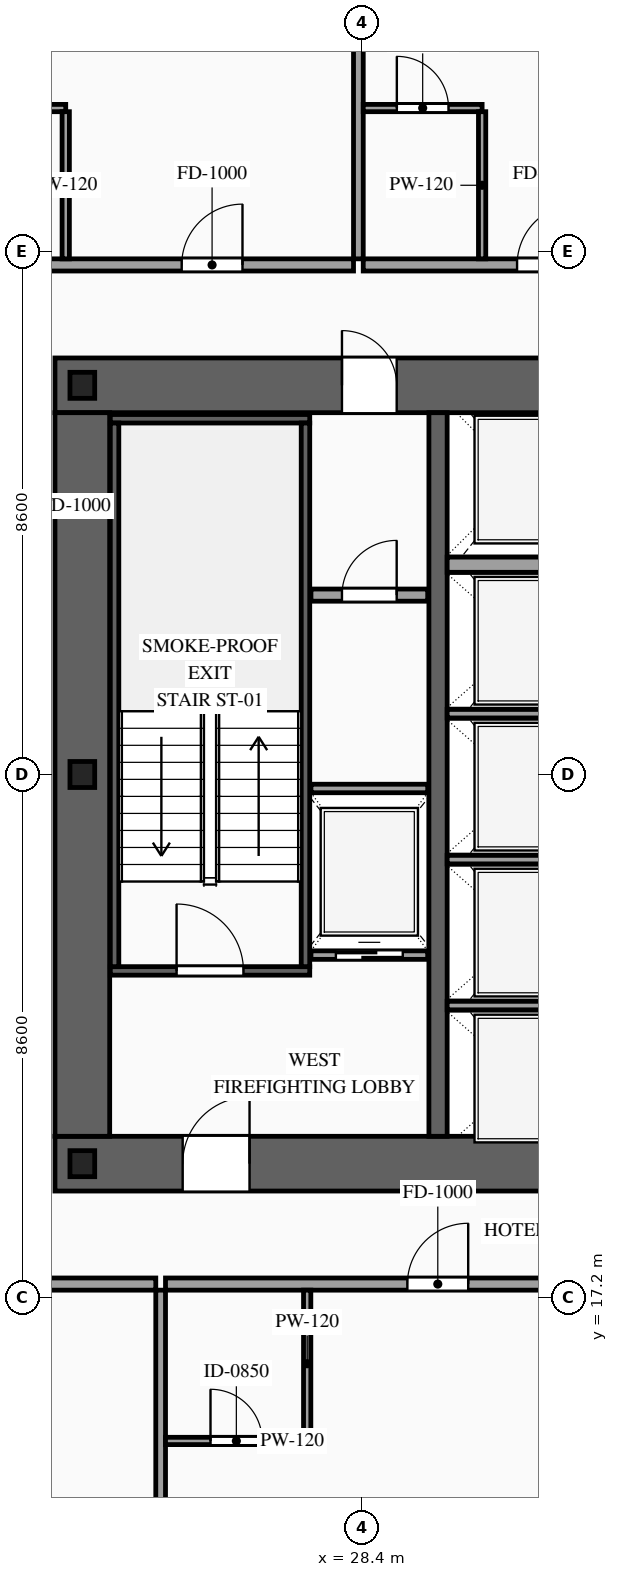
"""IFC4 building model, lengths in metres.
Left out: names, types, materials, properties, quantities, classifications, styles, units other than length and angle.
Written with IfcOpenShell. Run it as: python <this file> out.ifc"""

import sys

from ifc_helpers import new_model, si_unit, direction, frame, frame_2d, origin, origin_2d, place, context, subcontext, project, spatial, rectangle, i_section, extrude, source, transform, mapped, element, fill, save


model = new_model("IFC4")
c1 = context("Model", 3, precision=1e-05, world=origin(), true_north=direction((0.0, 1.0)))
c2 = subcontext(c1, "Body", "Model", "MODEL_VIEW")
j1 = project(units=[si_unit("LENGTHUNIT", "METRE"), si_unit("PLANEANGLEUNIT", "RADIAN")], contexts=[c1])
p1 = place(None, origin())
s1 = spatial("IfcSite", under=j1, at=p1, CompositionType="ELEMENT")
p2 = place(p1, origin())
s2 = spatial("IfcBuilding", under=s1, at=p2, CompositionType="ELEMENT")
p3 = place(p2, frame((0.0, 0.0, 46.0)))
s3 = spatial("IfcBuildingStorey", under=s2, at=p3, CompositionType="ELEMENT", Elevation=46.0)
p4 = place(p3, frame((23.35, 19.4, 0.0), z_axis=(0.0, 0.0, 1.0), x_axis=(1.0, 0.0, 0.0)))
e1 = element("IfcWall", 1, at=p4, inside=s3, PredefinedType="SHEAR", context=c2, shape_type="SweptSolid", body=[
    extrude(rectangle(XDim=27.3, YDim=0.9, at=frame_2d((13.65, 0.0))), origin(), (0.0, 0.0, 1.0), 3.6),
])
p5 = place(p4, frame((2.1, 0.0, 0.0)))
e2 = element("IfcOpeningElement", 2, at=p5, cuts=e1, PredefinedType="OPENING", context=c2, shape_type="SweptSolid", body=[
    extrude(rectangle(XDim=1.1, YDim=2.2, at=frame_2d((0.55, 1.1))), frame((0.0, 0.465, 0.0), z_axis=(0.0, -1.0, 0.0), x_axis=(1.0, 0.0, 0.0)), (0.0, 0.0, 1.0), 0.93),
])
p6 = place(p4, frame((10.0, 0.0, 0.0)))
e3 = element("IfcOpeningElement", 3, at=p6, cuts=e1, PredefinedType="OPENING", context=c2, shape_type="SweptSolid", body=[
    extrude(rectangle(XDim=1.1, YDim=2.2, at=frame_2d((0.55, 1.1))), frame((0.0, 0.465, 0.0), z_axis=(0.0, -1.0, 0.0), x_axis=(1.0, 0.0, 0.0)), (0.0, 0.0, 1.0), 0.93),
])
p7 = place(p4, frame((23.2, 0.0, 0.0)))
e4 = element("IfcOpeningElement", 4, at=p7, cuts=e1, PredefinedType="OPENING", context=c2, shape_type="SweptSolid", body=[
    extrude(rectangle(XDim=1.1, YDim=2.2, at=frame_2d((0.55, 1.1))), frame((0.0, 0.465, 0.0), z_axis=(0.0, -1.0, 0.0), x_axis=(1.0, 0.0, 0.0)), (0.0, 0.0, 1.0), 0.93),
])
p8 = place(p4, frame((19.82, 0.0, 0.0)))
e5 = element("IfcOpeningElement", 5, at=p8, cuts=e1, PredefinedType="OPENING", context=c2, shape_type="SweptSolid", body=[
    extrude(rectangle(XDim=0.9, YDim=2.15, at=frame_2d((0.45, 1.075))), frame((0.0, 0.465, 0.0), z_axis=(0.0, -1.0, 0.0), x_axis=(1.0, 0.0, 0.0)), (0.0, 0.0, 1.0), 0.93),
])
p9 = place(p4, frame((18.38, 0.0, 0.0)))
e6 = element("IfcOpeningElement", 6, at=p9, cuts=e1, PredefinedType="OPENING", context=c2, shape_type="SweptSolid", body=[
    extrude(rectangle(XDim=0.9, YDim=2.15, at=frame_2d((0.45, 1.075))), frame((0.0, 0.465, 0.0), z_axis=(0.0, -1.0, 0.0), x_axis=(1.0, 0.0, 0.0)), (0.0, 0.0, 1.0), 0.93),
])
p10 = place(p3, frame((23.35, 32.2, 0.0), z_axis=(0.0, 0.0, 1.0), x_axis=(1.0, 0.0, 0.0)))
e7 = element("IfcWall", 7, at=p10, inside=s3, PredefinedType="SHEAR", context=c2, shape_type="SweptSolid", body=[
    extrude(rectangle(XDim=27.3, YDim=0.9, at=frame_2d((13.65, 0.0))), origin(), (0.0, 0.0, 1.0), 3.6),
])
p11 = place(p10, frame((4.72, 0.0, 0.0)))
e8 = element("IfcOpeningElement", 8, at=p11, cuts=e7, PredefinedType="OPENING", context=c2, shape_type="SweptSolid", body=[
    extrude(rectangle(XDim=0.9, YDim=2.15, at=frame_2d((0.45, 1.075))), frame((0.0, 0.465, 0.0), z_axis=(0.0, -1.0, 0.0), x_axis=(1.0, 0.0, 0.0)), (0.0, 0.0, 1.0), 0.93),
])
p12 = place(p10, frame((10.0, 0.0, 0.0)))
e9 = element("IfcOpeningElement", 9, at=p12, cuts=e7, PredefinedType="OPENING", context=c2, shape_type="SweptSolid", body=[
    extrude(rectangle(XDim=1.1, YDim=2.2, at=frame_2d((0.55, 1.1))), frame((0.0, 0.465, 0.0), z_axis=(0.0, -1.0, 0.0), x_axis=(1.0, 0.0, 0.0)), (0.0, 0.0, 1.0), 0.93),
])
p13 = place(p10, frame((15.85, 0.0, 0.0)))
e10 = element("IfcOpeningElement", 10, at=p13, cuts=e7, PredefinedType="OPENING", context=c2, shape_type="SweptSolid", body=[
    extrude(rectangle(XDim=1.1, YDim=2.2, at=frame_2d((0.55, 1.1))), frame((0.0, 0.465, 0.0), z_axis=(0.0, -1.0, 0.0), x_axis=(1.0, 0.0, 0.0)), (0.0, 0.0, 1.0), 0.93),
])
p14 = place(p10, frame((19.05, 0.0, 0.0)))
e11 = element("IfcOpeningElement", 11, at=p14, cuts=e7, PredefinedType="OPENING", context=c2, shape_type="SweptSolid", body=[
    extrude(rectangle(XDim=0.9, YDim=2.15, at=frame_2d((0.45, 1.075))), frame((0.0, 0.465, 0.0), z_axis=(0.0, -1.0, 0.0), x_axis=(1.0, 0.0, 0.0)), (0.0, 0.0, 1.0), 0.93),
])
m1 = source(origin(), c2, "Body", "SweptSolid", [
    extrude(rectangle(XDim=11.9, YDim=0.9, at=frame_2d((5.95, 0.0))), origin(), (0.0, 0.0, 1.0), 3.6),
])
p15 = place(p3, frame((23.8, 19.85, 0.0), z_axis=(0.0, 0.0, 1.0), x_axis=(0.0, 1.0, 0.0)))
e12 = element("IfcWall", 12, at=p15, inside=s3, PredefinedType="SHEAR", context=c2, shape_type="MappedRepresentation", body=[
    mapped(m1, transform((0.0, 0.0, 0.0), scale=1.0)),
])
m2 = source(origin(), c2, "Body", "SweptSolid", [
    extrude(rectangle(XDim=11.9, YDim=0.3, at=frame_2d((5.95, 0.0))), origin(), (0.0, 0.0, 1.0), 3.6),
])
p16 = place(p3, frame((29.65, 19.85, 0.0), z_axis=(0.0, 0.0, 1.0), x_axis=(0.0, 1.0, 0.0)))
e13 = element("IfcWall", 13, at=p16, inside=s3, PredefinedType="SOLIDWALL", context=c2, shape_type="MappedRepresentation", body=[
    mapped(m2, transform((0.0, 0.0, 0.0), scale=1.0)),
])
m3 = source(origin(), c2, "Body", "SweptSolid", [
    extrude(i_section(OverallWidth=0.407, OverallDepth=0.428, WebThickness=0.02, FlangeThickness=0.035, at=origin_2d()), origin(), (0.0, 0.0, 1.0), 3.6),
])
for number, where, z_axis, x_axis in (
    (14, (23.8, 19.4, 0.0), (0.0, 0.0, 1.0), (1.0, 0.0, 0.0)),
    (15, (23.8, 25.8, 0.0), (0.0, 0.0, 1.0), (1.0, 0.0, 0.0)),
    (16, (23.8, 32.2, 0.0), (0.0, 0.0, 1.0), (1.0, 0.0, 0.0)),
):
    element("IfcColumn", number, at=place(p3, frame(where, z_axis=z_axis, x_axis=x_axis)), inside=s3, PredefinedType="COLUMN", context=c2, shape_type="MappedRepresentation", body=[
        mapped(m3, transform((0.0, 0.0, 0.0), scale=1.0)),
    ])
p17 = place(p3, frame((27.56, 22.83, 0.0), z_axis=(0.0, 0.0, 1.0), x_axis=(1.0, 0.0, 0.0)))
e17 = element("IfcWall", 17, at=p17, inside=s3, PredefinedType="SOLIDWALL", context=c2, shape_type="SweptSolid", body=[
    extrude(rectangle(XDim=1.92, YDim=0.14, at=frame_2d((0.96, 0.0))), origin(), (0.0, 0.0, 1.0), 3.38),
])
p18 = place(p17, frame((0.41, 0.0, 0.0)))
e18 = element("IfcOpeningElement", 18, at=p18, cuts=e17, PredefinedType="OPENING", context=c2, shape_type="SweptSolid", body=[
    extrude(rectangle(XDim=1.1, YDim=2.2, at=frame_2d((0.55, 1.1))), frame((0.0, 0.085, 0.0), z_axis=(0.0, -1.0, 0.0), x_axis=(1.0, 0.0, 0.0)), (0.0, 0.0, 1.0), 0.17),
])
m4 = source(origin(), c2, "Body", "SweptSolid", [
    extrude(rectangle(XDim=1.92, YDim=0.14, at=frame_2d((0.96, 0.0))), origin(), (0.0, 0.0, 1.0), 3.38),
])
p19 = place(p3, frame((27.56, 25.57, 0.0), z_axis=(0.0, 0.0, 1.0), x_axis=(1.0, 0.0, 0.0)))
e19 = element("IfcWall", 19, at=p19, inside=s3, PredefinedType="SOLIDWALL", context=c2, shape_type="MappedRepresentation", body=[
    mapped(m4, transform((0.0, 0.0, 0.0), scale=1.0)),
])
m5 = source(origin(), c2, "Body", "SweptSolid", [
    extrude(rectangle(XDim=2.5, YDim=0.14, at=frame_2d((1.25, 0.0))), origin(), (0.0, 0.0, 1.0), 3.38),
])
for number, where, z_axis, x_axis in (
    (20, (29.8, 22.0, 0.0), (0.0, 0.0, 1.0), (1.0, 0.0, 0.0)),
    (21, (29.8, 24.4, 0.0), (0.0, 0.0, 1.0), (1.0, 0.0, 0.0)),
    (22, (29.8, 26.8, 0.0), (0.0, 0.0, 1.0), (1.0, 0.0, 0.0)),
):
    element("IfcWall", number, at=place(p3, frame(where, z_axis=z_axis, x_axis=x_axis)), inside=s3, PredefinedType="SOLIDWALL", context=c2, shape_type="MappedRepresentation", body=[
        mapped(m5, transform((0.0, 0.0, 0.0), scale=1.0)),
    ])
m6 = source(origin(), c2, "Body", "SweptSolid", [
    extrude(rectangle(XDim=2.5, YDim=0.25, at=frame_2d((1.25, 0.0))), origin(), (0.0, 0.0, 1.0), 3.38),
])
p20 = place(p3, frame((29.8, 29.25, 0.0), z_axis=(0.0, 0.0, 1.0), x_axis=(1.0, 0.0, 0.0)))
e23 = element("IfcWall", 23, at=p20, inside=s3, PredefinedType="SOLIDWALL", context=c2, shape_type="MappedRepresentation", body=[
    mapped(m6, transform((0.0, 0.0, 0.0), scale=1.0)),
])
p21 = place(p3, frame((24.26, 22.57, 0.0), z_axis=(0.0, 0.0, 1.0), x_axis=(1.0, 0.0, 0.0)))
e24 = element("IfcWall", 24, at=p21, inside=s3, PredefinedType="SOLIDWALL", context=c2, shape_type="SweptSolid", body=[
    extrude(rectangle(XDim=3.28, YDim=0.14, at=frame_2d((1.64, 0.0))), origin(), (0.0, 0.0, 1.0), 3.38),
])
p22 = place(p21, frame((1.09, 0.0, 0.0)))
e25 = element("IfcOpeningElement", 25, at=p22, cuts=e24, PredefinedType="OPENING", context=c2, shape_type="SweptSolid", body=[
    extrude(rectangle(XDim=1.1, YDim=2.2, at=frame_2d((0.55, 1.1))), frame((0.0, 0.085, 0.0), z_axis=(0.0, -1.0, 0.0), x_axis=(1.0, 0.0, 0.0)), (0.0, 0.0, 1.0), 0.17),
])
m7 = source(origin(), c2, "Body", "SweptSolid", [
    extrude(rectangle(XDim=3.28, YDim=0.14, at=frame_2d((1.64, 0.0))), origin(), (0.0, 0.0, 1.0), 3.38),
])
p23 = place(p3, frame((24.26, 31.65, 0.0), z_axis=(0.0, 0.0, 1.0), x_axis=(1.0, 0.0, 0.0)))
e26 = element("IfcWall", 26, at=p23, inside=s3, PredefinedType="SOLIDWALL", context=c2, shape_type="MappedRepresentation", body=[
    mapped(m7, transform((0.0, 0.0, 0.0), scale=1.0)),
])
m8 = source(origin(), c2, "Body", "SweptSolid", [
    extrude(rectangle(XDim=8.94, YDim=0.14, at=frame_2d((4.47, 0.0))), origin(), (0.0, 0.0, 1.0), 3.38),
])
for number, where, z_axis, x_axis in (
    (27, (24.33, 22.64, 0.0), (0.0, 0.0, 1.0), (0.0, 1.0, 0.0)),
    (28, (27.47, 22.64, 0.0), (0.0, 0.0, 1.0), (0.0, 1.0, 0.0)),
):
    element("IfcWall", number, at=place(p3, frame(where, z_axis=z_axis, x_axis=x_axis)), inside=s3, PredefinedType="SOLIDWALL", context=c2, shape_type="MappedRepresentation", body=[
        mapped(m8, transform((0.0, 0.0, 0.0), scale=1.0)),
    ])
p24 = place(p3, frame((27.56, 28.75, 0.0), z_axis=(0.0, 0.0, 1.0), x_axis=(1.0, 0.0, 0.0)))
e29 = element("IfcWall", 29, at=p24, inside=s3, PredefinedType="PARTITIONING", context=c2, shape_type="SweptSolid", body=[
    extrude(rectangle(XDim=1.92, YDim=0.2, at=frame_2d((0.96, 0.0))), origin(), (0.0, 0.0, 1.0), 3.38),
])
p25 = place(p24, frame((0.51, 0.0, 0.0)))
e30 = element("IfcOpeningElement", 30, at=p25, cuts=e29, PredefinedType="OPENING", context=c2, shape_type="SweptSolid", body=[
    extrude(rectangle(XDim=0.9, YDim=2.15, at=frame_2d((0.45, 1.075))), frame((0.0, 0.115, 0.0), z_axis=(0.0, -1.0, 0.0), x_axis=(1.0, 0.0, 0.0)), (0.0, 0.0, 1.0), 0.23),
])
p26 = place(p3, frame((14.94, 17.42, 0.0), z_axis=(0.0, 0.0, 1.0), x_axis=(1.0, 0.0, 0.0)))
e31 = element("IfcWall", 31, at=p26, inside=s3, PredefinedType="PARTITIONING", context=c2, shape_type="SweptSolid", body=[
    extrude(rectangle(XDim=10.068, YDim=0.2, at=frame_2d((5.034, 0.0))), origin(), (0.0, 0.0, 1.0), 3.38),
])
p27 = place(p26, frame((5.739, 0.0, 0.0)))
e32 = element("IfcOpeningElement", 32, at=p27, cuts=e31, PredefinedType="OPENING", context=c2, shape_type="SweptSolid", body=[
    extrude(rectangle(XDim=1.0, YDim=2.2, at=frame_2d((0.5, 1.1))), frame((0.0, 0.115, 0.0), z_axis=(0.0, -1.0, 0.0), x_axis=(1.0, 0.0, 0.0)), (0.0, 0.0, 1.0), 0.23),
])
m9 = source(origin(), c2, "Body", "SweptSolid", [
    extrude(rectangle(XDim=16.47, YDim=0.16, at=frame_2d((8.235, 0.0))), origin(), (0.0, 0.0, 1.0), 3.38),
])
p28 = place(p3, frame((25.088, 0.85, 0.0), z_axis=(0.0, 0.0, 1.0), x_axis=(0.0, 1.0, 0.0)))
e33 = element("IfcWall", 33, at=p28, inside=s3, PredefinedType="PARTITIONING", context=c2, shape_type="MappedRepresentation", body=[
    mapped(m9, transform((0.0, 0.0, 0.0), scale=1.0)),
])
p29 = place(p3, frame((25.168, 17.42, 0.0), z_axis=(0.0, 0.0, 1.0), x_axis=(1.0, 0.0, 0.0)))
e34 = element("IfcWall", 34, at=p29, inside=s3, PredefinedType="PARTITIONING", context=c2, shape_type="SweptSolid", body=[
    extrude(rectangle(XDim=6.546, YDim=0.2, at=frame_2d((3.273, 0.0))), origin(), (0.0, 0.0, 1.0), 3.38),
])
p30 = place(p29, frame((3.978, 0.0, 0.0)))
e35 = element("IfcOpeningElement", 35, at=p30, cuts=e34, PredefinedType="OPENING", context=c2, shape_type="SweptSolid", body=[
    extrude(rectangle(XDim=1.0, YDim=2.2, at=frame_2d((0.5, 1.1))), frame((0.0, 0.115, 0.0), z_axis=(0.0, -1.0, 0.0), x_axis=(1.0, 0.0, 0.0)), (0.0, 0.0, 1.0), 0.23),
])
p31 = place(p3, frame((25.168, 14.84, 0.0), z_axis=(0.0, 0.0, 1.0), x_axis=(1.0, 0.0, 0.0)))
e36 = element("IfcWall", 36, at=p31, inside=s3, PredefinedType="PARTITIONING", context=c2, shape_type="SweptSolid", body=[
    extrude(rectangle(XDim=2.33, YDim=0.12, at=frame_2d((1.165, 0.0))), origin(), (0.0, 0.0, 1.0), 3.38),
])
p32 = place(p31, frame((0.74, 0.0, 0.0)))
e37 = element("IfcOpeningElement", 37, at=p32, cuts=e36, PredefinedType="OPENING", context=c2, shape_type="SweptSolid", body=[
    extrude(rectangle(XDim=0.85, YDim=2.1, at=frame_2d((0.425, 1.05))), frame((0.0, 0.075, 0.0), z_axis=(0.0, -1.0, 0.0), x_axis=(1.0, 0.0, 0.0)), (0.0, 0.0, 1.0), 0.15),
])
m10 = source(origin(), c2, "Body", "SweptSolid", [
    extrude(rectangle(XDim=2.42, YDim=0.12, at=frame_2d((1.21, 0.0))), origin(), (0.0, 0.0, 1.0), 3.38),
])
p33 = place(p3, frame((27.498, 14.9, 0.0), z_axis=(0.0, 0.0, 1.0), x_axis=(0.0, 1.0, 0.0)))
e38 = element("IfcWall", 38, at=p33, inside=s3, PredefinedType="PARTITIONING", context=c2, shape_type="MappedRepresentation", body=[
    mapped(m10, transform((0.0, 0.0, 0.0), scale=1.0)),
])
p34 = place(p3, frame((21.197, 34.18, 0.0), z_axis=(0.0, 0.0, 1.0), x_axis=(1.0, 0.0, 0.0)))
e39 = element("IfcWall", 39, at=p34, inside=s3, PredefinedType="PARTITIONING", context=c2, shape_type="SweptSolid", body=[
    extrude(rectangle(XDim=7.063, YDim=0.2, at=frame_2d((3.531, 0.0))), origin(), (0.0, 0.0, 1.0), 3.38),
])
p35 = place(p34, frame((4.237, 0.0, 0.0)))
e40 = element("IfcOpeningElement", 40, at=p35, cuts=e39, PredefinedType="OPENING", context=c2, shape_type="SweptSolid", body=[
    extrude(rectangle(XDim=1.0, YDim=2.2, at=frame_2d((0.5, 1.1))), frame((0.0, 0.115, 0.0), z_axis=(0.0, -1.0, 0.0), x_axis=(1.0, 0.0, 0.0)), (0.0, 0.0, 1.0), 0.23),
])
p36 = place(p3, frame((28.34, 34.28, 0.0), z_axis=(0.0, 0.0, 1.0), x_axis=(0.0, 1.0, 0.0)))
e41 = element("IfcWall", 41, at=p36, inside=s3, PredefinedType="PARTITIONING", context=c2, shape_type="MappedRepresentation", body=[
    mapped(m9, transform((0.0, 0.0, 0.0), scale=1.0)),
])
p37 = place(p3, frame((21.197, 36.76, 0.0), z_axis=(0.0, 0.0, 1.0), x_axis=(1.0, 0.0, 0.0)))
e42 = element("IfcWall", 42, at=p37, inside=s3, PredefinedType="PARTITIONING", context=c2, shape_type="SweptSolid", body=[
    extrude(rectangle(XDim=2.33, YDim=0.12, at=frame_2d((1.165, 0.0))), origin(), (0.0, 0.0, 1.0), 3.38),
])
p38 = place(p37, frame((0.74, 0.0, 0.0)))
e43 = element("IfcOpeningElement", 43, at=p38, cuts=e42, PredefinedType="OPENING", context=c2, shape_type="SweptSolid", body=[
    extrude(rectangle(XDim=0.85, YDim=2.1, at=frame_2d((0.425, 1.05))), frame((0.0, 0.075, 0.0), z_axis=(0.0, -1.0, 0.0), x_axis=(1.0, 0.0, 0.0)), (0.0, 0.0, 1.0), 0.15),
])
m11 = source(origin(), c2, "Body", "SweptSolid", [
    extrude(rectangle(XDim=2.42, YDim=0.12, at=frame_2d((1.21, 0.0))), origin(), (0.0, 0.0, 1.0), 3.38),
])
p39 = place(p3, frame((23.527, 34.28, 0.0), z_axis=(0.0, 0.0, 1.0), x_axis=(0.0, 1.0, 0.0)))
e44 = element("IfcWall", 44, at=p39, inside=s3, PredefinedType="PARTITIONING", context=c2, shape_type="MappedRepresentation", body=[
    mapped(m11, transform((0.0, 0.0, 0.0), scale=1.0)),
])
p40 = place(p3, frame((28.42, 34.18, 0.0), z_axis=(0.0, 0.0, 1.0), x_axis=(1.0, 0.0, 0.0)))
e45 = element("IfcWall", 45, at=p40, inside=s3, PredefinedType="PARTITIONING", context=c2, shape_type="SweptSolid", body=[
    extrude(rectangle(XDim=4.025, YDim=0.2, at=frame_2d((2.013, 0.0))), origin(), (0.0, 0.0, 1.0), 3.38),
])
p41 = place(p40, frame((2.53, 0.0, 0.0)))
e46 = element("IfcOpeningElement", 46, at=p41, cuts=e45, PredefinedType="OPENING", context=c2, shape_type="SweptSolid", body=[
    extrude(rectangle(XDim=1.0, YDim=2.2, at=frame_2d((0.5, 1.1))), frame((0.0, 0.115, 0.0), z_axis=(0.0, -1.0, 0.0), x_axis=(1.0, 0.0, 0.0)), (0.0, 0.0, 1.0), 0.23),
])
p42 = place(p3, frame((28.42, 36.76, 0.0), z_axis=(0.0, 0.0, 1.0), x_axis=(1.0, 0.0, 0.0)))
e47 = element("IfcWall", 47, at=p42, inside=s3, PredefinedType="PARTITIONING", context=c2, shape_type="SweptSolid", body=[
    extrude(rectangle(XDim=1.955, YDim=0.12, at=frame_2d((0.978, 0.0))), origin(), (0.0, 0.0, 1.0), 3.38),
])
p43 = place(p42, frame((0.552, 0.0, 0.0)))
e48 = element("IfcOpeningElement", 48, at=p43, cuts=e47, PredefinedType="OPENING", context=c2, shape_type="SweptSolid", body=[
    extrude(rectangle(XDim=0.85, YDim=2.1, at=frame_2d((0.425, 1.05))), frame((0.0, 0.075, 0.0), z_axis=(0.0, -1.0, 0.0), x_axis=(1.0, 0.0, 0.0)), (0.0, 0.0, 1.0), 0.15),
])
p44 = place(p3, frame((30.375, 34.28, 0.0), z_axis=(0.0, 0.0, 1.0), x_axis=(0.0, 1.0, 0.0)))
e49 = element("IfcWall", 49, at=p44, inside=s3, PredefinedType="PARTITIONING", context=c2, shape_type="MappedRepresentation", body=[
    mapped(m11, transform((0.0, 0.0, 0.0), scale=1.0)),
])
m12 = source(origin(), c2, "Body", "SweptSolid", [
    extrude(rectangle(XDim=1.1, YDim=2.2, at=frame_2d((0.55, 1.1))), frame((0.0, 0.025, 0.0), z_axis=(0.0, -1.0, 0.0), x_axis=(1.0, 0.0, 0.0)), (0.0, 0.0, 1.0), 0.05),
])
p45 = place(p18, origin())
e50 = element("IfcDoor", 50, at=p45, inside=s3, OperationType="SLIDING_TO_LEFT", PredefinedType="DOOR", context=c2, shape_type="MappedRepresentation", body=[
    mapped(m12, transform((0.0, 0.0, 0.0), scale=1.0)),
])
fill(e18, e50)
m13 = source(origin(), c2, "Body", "SweptSolid", [
    extrude(rectangle(XDim=1.1, YDim=2.2, at=frame_2d((0.55, 1.1))), frame((0.0, 0.025, 0.0), z_axis=(0.0, -1.0, 0.0), x_axis=(1.0, 0.0, 0.0)), (0.0, 0.0, 1.0), 0.05),
])
p46 = place(p22, origin())
e51 = element("IfcDoor", 51, at=p46, inside=s3, OperationType="SINGLE_SWING_LEFT", PredefinedType="DOOR", context=c2, shape_type="MappedRepresentation", body=[
    mapped(m13, transform((0.0, 0.0, 0.0), scale=1.0)),
])
fill(e25, e51)
p47 = place(p5, origin())
e52 = element("IfcDoor", 52, at=p47, inside=s3, OperationType="SINGLE_SWING_RIGHT", PredefinedType="DOOR", context=c2, shape_type="MappedRepresentation", body=[
    mapped(m13, transform((0.0, 0.0, 0.0), scale=1.0)),
])
fill(e2, e52)
m14 = source(origin(), c2, "Body", "SweptSolid", [
    extrude(rectangle(XDim=0.9, YDim=2.15, at=frame_2d((0.45, 1.075))), frame((0.0, 0.025, 0.0), z_axis=(0.0, -1.0, 0.0), x_axis=(1.0, 0.0, 0.0)), (0.0, 0.0, 1.0), 0.05),
])
p48 = place(p11, origin())
e53 = element("IfcDoor", 53, at=p48, inside=s3, OperationType="SINGLE_SWING_LEFT", PredefinedType="DOOR", context=c2, shape_type="MappedRepresentation", body=[
    mapped(m14, transform((0.0, 0.0, 0.0), scale=1.0)),
])
fill(e8, e53)
p49 = place(p25, origin())
e54 = element("IfcDoor", 54, at=p49, inside=s3, OperationType="SINGLE_SWING_RIGHT", PredefinedType="DOOR", context=c2, shape_type="MappedRepresentation", body=[
    mapped(m14, transform((0.0, 0.0, 0.0), scale=1.0)),
])
fill(e30, e54)
m15 = source(origin(), c2, "Body", "SweptSolid", [
    extrude(rectangle(XDim=1.0, YDim=2.2, at=frame_2d((0.5, 1.1))), frame((0.0, 0.025, 0.0), z_axis=(0.0, -1.0, 0.0), x_axis=(1.0, 0.0, 0.0)), (0.0, 0.0, 1.0), 0.05),
])
p50 = place(p30, origin())
e55 = element("IfcDoor", 55, at=p50, inside=s3, OperationType="SINGLE_SWING_RIGHT", PredefinedType="DOOR", context=c2, shape_type="MappedRepresentation", body=[
    mapped(m15, transform((0.0, 0.0, 0.0), scale=1.0)),
])
fill(e35, e55)
m16 = source(origin(), c2, "Body", "SweptSolid", [
    extrude(rectangle(XDim=0.85, YDim=2.1, at=frame_2d((0.425, 1.05))), frame((0.0, 0.025, 0.0), z_axis=(0.0, -1.0, 0.0), x_axis=(1.0, 0.0, 0.0)), (0.0, 0.0, 1.0), 0.05),
])
p51 = place(p32, origin())
e56 = element("IfcDoor", 56, at=p51, inside=s3, OperationType="SINGLE_SWING_LEFT", PredefinedType="DOOR", context=c2, shape_type="MappedRepresentation", body=[
    mapped(m16, transform((0.0, 0.0, 0.0), scale=1.0)),
])
fill(e37, e56)
p52 = place(p35, origin())
e57 = element("IfcDoor", 57, at=p52, inside=s3, OperationType="SINGLE_SWING_RIGHT", PredefinedType="DOOR", context=c2, shape_type="MappedRepresentation", body=[
    mapped(m15, transform((0.0, 0.0, 0.0), scale=1.0)),
])
fill(e40, e57)
p53 = place(p41, origin())
e58 = element("IfcDoor", 58, at=p53, inside=s3, OperationType="SINGLE_SWING_RIGHT", PredefinedType="DOOR", context=c2, shape_type="MappedRepresentation", body=[
    mapped(m15, transform((0.0, 0.0, 0.0), scale=1.0)),
])
fill(e46, e58)
p54 = place(p43, origin())
e59 = element("IfcDoor", 59, at=p54, inside=s3, OperationType="SINGLE_SWING_LEFT", PredefinedType="DOOR", context=c2, shape_type="MappedRepresentation", body=[
    mapped(m16, transform((0.0, 0.0, 0.0), scale=1.0)),
])
fill(e48, e59)
save(model, sys.argv[1])
